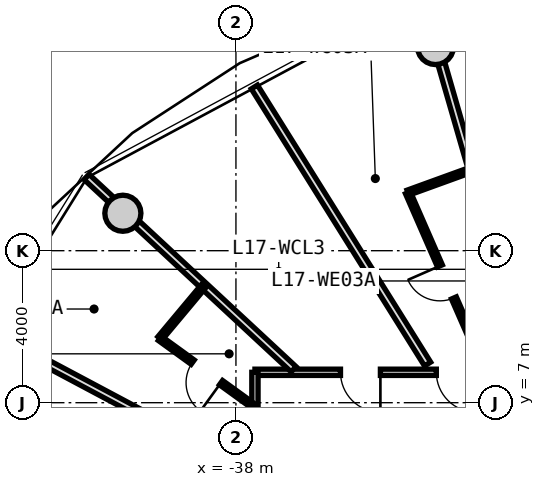
"""IFC4 building model, lengths in metres.
Left out: names, types, materials, properties, quantities, classifications, styles, units other than length and angle.
Written with IfcOpenShell. Run it as: python <this file> out.ifc"""

import sys

from ifc_helpers import new_model, si_unit, direction, frame, frame_2d, origin, origin_2d, place, context, subcontext, project, spatial, rectangle, circle, extrude, source, transform, mapped, element, fill, save


model = new_model("IFC4")
c1 = context("Model", 3, precision=1e-05, world=origin(), true_north=direction((0.0, 1.0)))
c2 = subcontext(c1, "Body", "Model", "MODEL_VIEW")
j1 = project(units=[si_unit("LENGTHUNIT", "METRE"), si_unit("PLANEANGLEUNIT", "RADIAN")], contexts=[c1])
p1 = place(None, origin())
s1 = spatial("IfcSite", under=j1, at=p1, CompositionType="ELEMENT")
p2 = place(p1, origin())
s2 = spatial("IfcBuilding", under=s1, at=p2, CompositionType="ELEMENT")
p3 = place(p2, frame((0.0, 0.0, 58.2)))
s3 = spatial("IfcBuildingStorey", under=s2, at=p3, CompositionType="ELEMENT", Elevation=58.2)
m1 = source(origin(), c2, "Body", "SweptSolid", [
    extrude(circle(Radius=0.475, at=origin_2d()), origin(), (0.0, 0.0, 1.0), 3.05),
])
for number, where, z_axis, x_axis in (
    (1, (-32.749, 16.373, 0.0), (0.0, 0.0, 1.0), (1.0, 0.0, 0.0)),
    (2, (-40.975, 11.985, 0.0), (0.0, 0.0, 1.0), (1.0, 0.0, 0.0)),
):
    element("IfcColumn", number, at=place(p3, frame(where, z_axis=z_axis, x_axis=x_axis)), inside=s3, PredefinedType="COLUMN", context=c2, shape_type="MappedRepresentation", body=[
        mapped(m1, transform((0.0, 0.0, 0.0), x_axis=(1.0, 0.0, 0.0), y_axis=(0.0, 1.0, 0.0), z_axis=(0.0, 0.0, 1.0), scale=1.0)),
    ])
m2 = source(origin(), c2, "Body", "SweptSolid", [
    extrude(rectangle(XDim=19.0, YDim=0.165, at=frame_2d((9.5, 0.0))), origin(), (0.0, 0.0, 1.0), 2.775),
])
p4 = place(p3, frame((-37.5, 7.8, 0.0), z_axis=(0.0, 0.0, 1.0), x_axis=(1.0, 0.0, 0.0)))
e3 = element("IfcWall", 3, at=p4, inside=s3, PredefinedType="PARTITIONING", context=c2, shape_type="MappedRepresentation", body=[
    mapped(m2, transform((0.0, 0.0, 0.0), x_axis=(1.0, 0.0, 0.0), y_axis=(0.0, 1.0, 0.0), z_axis=(0.0, 0.0, 1.0), scale=1.0)),
])
p5 = place(p4, frame((14.653, 0.0, 0.0)))
e4 = element("IfcOpeningElement", 4, at=p5, cuts=e3, PredefinedType="OPENING", context=c2, shape_type="SweptSolid", body=[
    extrude(rectangle(XDim=1.05, YDim=2.15, at=frame_2d((0.525, 1.075))), frame((0.0, 0.093, 0.0), z_axis=(0.0, -1.0, 0.0), x_axis=(1.0, 0.0, 0.0)), (0.0, 0.0, 1.0), 0.185),
])
p6 = place(p4, frame((12.5, 0.0, 0.0)))
e5 = element("IfcOpeningElement", 5, at=p6, cuts=e3, PredefinedType="OPENING", context=c2, shape_type="SweptSolid", body=[
    extrude(rectangle(XDim=1.05, YDim=2.15, at=frame_2d((0.525, 1.075))), frame((0.0, 0.093, 0.0), z_axis=(0.0, -1.0, 0.0), x_axis=(1.0, 0.0, 0.0)), (0.0, 0.0, 1.0), 0.185),
])
p7 = place(p4, frame((9.352, 0.0, 0.0)))
e6 = element("IfcOpeningElement", 6, at=p7, cuts=e3, PredefinedType="OPENING", context=c2, shape_type="SweptSolid", body=[
    extrude(rectangle(XDim=1.05, YDim=2.15, at=frame_2d((0.525, 1.075))), frame((0.0, 0.093, 0.0), z_axis=(0.0, -1.0, 0.0), x_axis=(1.0, 0.0, 0.0)), (0.0, 0.0, 1.0), 0.185),
])
p8 = place(p4, frame((7.806, 0.0, 0.0)))
e7 = element("IfcOpeningElement", 7, at=p8, cuts=e3, PredefinedType="OPENING", context=c2, shape_type="SweptSolid", body=[
    extrude(rectangle(XDim=1.05, YDim=2.15, at=frame_2d((0.525, 1.075))), frame((0.0, 0.093, 0.0), z_axis=(0.0, -1.0, 0.0), x_axis=(1.0, 0.0, 0.0)), (0.0, 0.0, 1.0), 0.185),
])
p9 = place(p4, frame((4.773, 0.0, 0.0)))
e8 = element("IfcOpeningElement", 8, at=p9, cuts=e3, PredefinedType="OPENING", context=c2, shape_type="SweptSolid", body=[
    extrude(rectangle(XDim=1.05, YDim=2.15, at=frame_2d((0.525, 1.075))), frame((0.0, 0.093, 0.0), z_axis=(0.0, -1.0, 0.0), x_axis=(1.0, 0.0, 0.0)), (0.0, 0.0, 1.0), 0.185),
])
p10 = place(p4, frame((2.251, 0.0, 0.0)))
e9 = element("IfcOpeningElement", 9, at=p10, cuts=e3, PredefinedType="OPENING", context=c2, shape_type="SweptSolid", body=[
    extrude(rectangle(XDim=1.05, YDim=2.15, at=frame_2d((0.525, 1.075))), frame((0.0, 0.093, 0.0), z_axis=(0.0, -1.0, 0.0), x_axis=(1.0, 0.0, 0.0)), (0.0, 0.0, 1.0), 0.185),
])
m3 = source(origin(), c2, "Body", "SweptSolid", [
    extrude(rectangle(XDim=15.6, YDim=0.165, at=frame_2d((7.8, 0.0))), origin(), (0.0, 0.0, 1.0), 2.775),
])
p11 = place(p3, frame((-37.5, -7.8, 0.0), z_axis=(0.0, 0.0, 1.0), x_axis=(0.0, 1.0, 0.0)))
e10 = element("IfcWall", 10, at=p11, inside=s3, PredefinedType="PARTITIONING", context=c2, shape_type="MappedRepresentation", body=[
    mapped(m3, transform((0.0, 0.0, 0.0), x_axis=(1.0, 0.0, 0.0), y_axis=(0.0, 1.0, 0.0), z_axis=(0.0, 0.0, 1.0), scale=1.0)),
])
p12 = place(p11, frame((7.812, 0.0, 0.0)))
e11 = element("IfcOpeningElement", 11, at=p12, cuts=e10, PredefinedType="OPENING", context=c2, shape_type="SweptSolid", body=[
    extrude(rectangle(XDim=1.05, YDim=2.15, at=frame_2d((0.525, 1.075))), frame((0.0, 0.093, 0.0), z_axis=(0.0, -1.0, 0.0), x_axis=(1.0, 0.0, 0.0)), (0.0, 0.0, 1.0), 0.185),
])
p13 = place(p11, frame((6.035, 0.0, 0.0)))
e12 = element("IfcOpeningElement", 12, at=p13, cuts=e10, PredefinedType="OPENING", context=c2, shape_type="SweptSolid", body=[
    extrude(rectangle(XDim=1.05, YDim=2.15, at=frame_2d((0.525, 1.075))), frame((0.0, 0.093, 0.0), z_axis=(0.0, -1.0, 0.0), x_axis=(1.0, 0.0, 0.0)), (0.0, 0.0, 1.0), 0.185),
])
p14 = place(p11, frame((2.826, 0.0, 0.0)))
e13 = element("IfcOpeningElement", 13, at=p14, cuts=e10, PredefinedType="OPENING", context=c2, shape_type="SweptSolid", body=[
    extrude(rectangle(XDim=1.05, YDim=2.15, at=frame_2d((0.525, 1.075))), frame((0.0, 0.093, 0.0), z_axis=(0.0, -1.0, 0.0), x_axis=(1.0, 0.0, 0.0)), (0.0, 0.0, 1.0), 0.185),
])
p15 = place(p11, frame((0.881, 0.0, 0.0)))
e14 = element("IfcOpeningElement", 14, at=p15, cuts=e10, PredefinedType="OPENING", context=c2, shape_type="SweptSolid", body=[
    extrude(rectangle(XDim=1.05, YDim=2.15, at=frame_2d((0.525, 1.075))), frame((0.0, 0.093, 0.0), z_axis=(0.0, -1.0, 0.0), x_axis=(1.0, 0.0, 0.0)), (0.0, 0.0, 1.0), 0.185),
])
p16 = place(p11, frame((13.293, 0.0, 0.0)))
e15 = element("IfcOpeningElement", 15, at=p16, cuts=e10, PredefinedType="OPENING", context=c2, shape_type="SweptSolid", body=[
    extrude(rectangle(XDim=1.05, YDim=2.15, at=frame_2d((0.525, 1.075))), frame((0.0, 0.093, 0.0), z_axis=(0.0, -1.0, 0.0), x_axis=(1.0, 0.0, 0.0)), (0.0, 0.0, 1.0), 0.185),
])
p17 = place(p11, frame((11.018, 0.0, 0.0)))
e16 = element("IfcOpeningElement", 16, at=p17, cuts=e10, PredefinedType="OPENING", context=c2, shape_type="SweptSolid", body=[
    extrude(rectangle(XDim=1.05, YDim=2.15, at=frame_2d((0.525, 1.075))), frame((0.0, 0.093, 0.0), z_axis=(0.0, -1.0, 0.0), x_axis=(1.0, 0.0, 0.0)), (0.0, 0.0, 1.0), 0.185),
])
m4 = source(origin(), c2, "Body", "SweptSolid", [
    extrude(rectangle(XDim=10.196, YDim=0.19, at=frame_2d((5.098, 0.0))), origin(), (0.0, 0.0, 1.0), 2.225),
])
p18 = place(p3, frame((-30.273, 7.88, 0.0), z_axis=(0.0, 0.0, 1.0), x_axis=(-0.277136420347, 0.960830580549, 0.0)))
e17 = element("IfcWall", 17, at=p18, inside=s3, PredefinedType="PARTITIONING", context=c2, shape_type="MappedRepresentation", body=[
    mapped(m4, transform((0.0, 0.0, 0.0), x_axis=(1.0, 0.0, 0.0), y_axis=(0.0, 1.0, 0.0), z_axis=(0.0, 0.0, 1.0), scale=1.0)),
])
m5 = source(origin(), c2, "Body", "SweptSolid", [
    extrude(rectangle(XDim=7.435, YDim=0.19, at=frame_2d((3.717, 0.0))), origin(), (0.0, 0.0, 1.0), 2.225),
])
p19 = place(p3, frame((-36.483, 7.88, 0.0), z_axis=(0.0, 0.0, 1.0), x_axis=(-0.732651956848, 0.680603489652, 0.0)))
e18 = element("IfcWall", 18, at=p19, inside=s3, PredefinedType="PARTITIONING", context=c2, shape_type="MappedRepresentation", body=[
    mapped(m5, transform((0.0, 0.0, 0.0), x_axis=(1.0, 0.0, 0.0), y_axis=(0.0, 1.0, 0.0), z_axis=(0.0, 0.0, 1.0), scale=1.0)),
])
m6 = source(origin(), c2, "Body", "SweptSolid", [
    extrude(rectangle(XDim=8.598, YDim=0.19, at=frame_2d((4.299, 0.0))), origin(), (0.0, 0.0, 1.0), 2.775),
])
p20 = place(p3, frame((-32.957, 8.017, 0.0), z_axis=(0.0, 0.0, 1.0), x_axis=(-0.530039776395, 0.847972779893, 0.0)))
e19 = element("IfcWall", 19, at=p20, inside=s3, PredefinedType="PARTITIONING", context=c2, shape_type="MappedRepresentation", body=[
    mapped(m6, transform((0.0, 0.0, 0.0), x_axis=(1.0, 0.0, 0.0), y_axis=(0.0, 1.0, 0.0), z_axis=(0.0, 0.0, 1.0), scale=1.0)),
])
m7 = source(origin(), c2, "Body", "SweptSolid", [
    extrude(rectangle(XDim=5.126, YDim=0.14, at=frame_2d((2.563, 0.0))), origin(), (0.0, 0.0, 1.0), 2.775),
])
p21 = place(p3, frame((-31.422, 7.83, 0.0), z_axis=(0.0, 0.0, 1.0), x_axis=(-0.400473994842, 0.916308124735, 0.0)))
e20 = element("IfcWall", 20, at=p21, inside=s3, PredefinedType="PARTITIONING", context=c2, shape_type="MappedRepresentation", body=[
    mapped(m7, transform((0.0, 0.0, 0.0), x_axis=(1.0, 0.0, 0.0), y_axis=(0.0, 1.0, 0.0), z_axis=(0.0, 0.0, 1.0), scale=1.0)),
])
p22 = place(p21, frame((2.103, 0.0, 0.0)))
e21 = element("IfcOpeningElement", 21, at=p22, cuts=e20, PredefinedType="OPENING", context=c2, shape_type="SweptSolid", body=[
    extrude(rectangle(XDim=0.92, YDim=2.1, at=frame_2d((0.46, 1.05))), frame((0.0, 0.08, 0.0), z_axis=(0.0, -1.0, 0.0), x_axis=(1.0, 0.0, 0.0)), (0.0, 0.0, 1.0), 0.16),
])
m8 = source(origin(), c2, "Body", "SweptSolid", [
    extrude(rectangle(XDim=1.811, YDim=0.14, at=frame_2d((0.906, 0.0))), origin(), (0.0, 0.0, 1.0), 2.775),
])
p23 = place(p3, frame((-33.475, 12.527, 0.0), z_axis=(0.0, 0.0, 1.0), x_axis=(0.940009682452, 0.341147764021, 0.0)))
e22 = element("IfcWall", 22, at=p23, inside=s3, PredefinedType="PARTITIONING", context=c2, shape_type="MappedRepresentation", body=[
    mapped(m8, transform((0.0, 0.0, 0.0), x_axis=(1.0, 0.0, 0.0), y_axis=(0.0, 1.0, 0.0), z_axis=(0.0, 0.0, 1.0), scale=1.0)),
])
m9 = source(origin(), c2, "Body", "SweptSolid", [
    extrude(rectangle(XDim=7.677, YDim=0.19, at=frame_2d((3.838, 0.0))), origin(), (0.0, 0.0, 1.0), 2.775),
])
p24 = place(p3, frame((-37.703, 5.231, 0.0), z_axis=(0.0, 0.0, 1.0), x_axis=(-0.882725057546, 0.469889851753, 0.0)))
e23 = element("IfcWall", 23, at=p24, inside=s3, PredefinedType="PARTITIONING", context=c2, shape_type="MappedRepresentation", body=[
    mapped(m9, transform((0.0, 0.0, 0.0), x_axis=(1.0, 0.0, 0.0), y_axis=(0.0, 1.0, 0.0), z_axis=(0.0, 0.0, 1.0), scale=1.0)),
])
m10 = source(origin(), c2, "Body", "SweptSolid", [
    extrude(rectangle(XDim=3.051, YDim=0.14, at=frame_2d((1.525, 0.0))), origin(), (0.0, 0.0, 1.0), 2.775),
])
p25 = place(p3, frame((-37.53, 6.903, 0.0), z_axis=(0.0, 0.0, 1.0), x_axis=(-0.809849031404, 0.586638343729, 0.0)))
e24 = element("IfcWall", 24, at=p25, inside=s3, PredefinedType="PARTITIONING", context=c2, shape_type="MappedRepresentation", body=[
    mapped(m10, transform((0.0, 0.0, 0.0), x_axis=(1.0, 0.0, 0.0), y_axis=(0.0, 1.0, 0.0), z_axis=(0.0, 0.0, 1.0), scale=1.0)),
])
p26 = place(p25, frame((1.065, 0.0, 0.0)))
e25 = element("IfcOpeningElement", 25, at=p26, cuts=e24, PredefinedType="OPENING", context=c2, shape_type="SweptSolid", body=[
    extrude(rectangle(XDim=0.92, YDim=2.1, at=frame_2d((0.46, 1.05))), frame((0.0, 0.08, 0.0), z_axis=(0.0, -1.0, 0.0), x_axis=(1.0, 0.0, 0.0)), (0.0, 0.0, 1.0), 0.16),
])
m11 = source(origin(), c2, "Body", "SweptSolid", [
    extrude(rectangle(XDim=1.84, YDim=0.14, at=frame_2d((0.92, 0.0))), origin(), (0.0, 0.0, 1.0), 2.415),
])
p27 = place(p3, frame((-40.0, 8.692, 0.0), z_axis=(0.0, 0.0, 1.0), x_axis=(0.641410397049, 0.767197955262, 0.0)))
e26 = element("IfcWall", 26, at=p27, inside=s3, PredefinedType="PARTITIONING", context=c2, shape_type="MappedRepresentation", body=[
    mapped(m11, transform((0.0, 0.0, 0.0), x_axis=(1.0, 0.0, 0.0), y_axis=(0.0, 1.0, 0.0), z_axis=(0.0, 0.0, 1.0), scale=1.0)),
])
m12 = source(origin(), c2, "Body", "SweptSolid", [
    extrude(rectangle(XDim=1.05, YDim=2.15, at=frame_2d((0.525, 1.075))), frame((0.0, 0.025, 0.0), z_axis=(0.0, -1.0, 0.0), x_axis=(1.0, 0.0, 0.0)), (0.0, 0.0, 1.0), 0.05),
])
p28 = place(p9, frame((1.05, 0.0, 0.0), z_axis=(0.0, 0.0, 1.0), x_axis=(-1.0, 0.0, 0.0)))
e27 = element("IfcDoor", 27, at=p28, inside=s3, OperationType="SINGLE_SWING_LEFT", PredefinedType="DOOR", context=c2, shape_type="MappedRepresentation", body=[
    mapped(m12, transform((0.0, 0.0, 0.0), x_axis=(1.0, 0.0, 0.0), y_axis=(0.0, 1.0, 0.0), z_axis=(0.0, 0.0, 1.0), scale=1.0)),
])
fill(e8, e27)
m13 = source(origin(), c2, "Body", "SweptSolid", [
    extrude(rectangle(XDim=0.92, YDim=2.1, at=frame_2d((0.46, 1.05))), frame((0.0, 0.025, 0.0), z_axis=(0.0, -1.0, 0.0), x_axis=(1.0, 0.0, 0.0)), (0.0, 0.0, 1.0), 0.05),
])
p29 = place(p22, origin())
e28 = element("IfcDoor", 28, at=p29, inside=s3, OperationType="SINGLE_SWING_RIGHT", PredefinedType="DOOR", context=c2, shape_type="MappedRepresentation", body=[
    mapped(m13, transform((0.0, 0.0, 0.0), x_axis=(1.0, 0.0, 0.0), y_axis=(0.0, 1.0, 0.0), z_axis=(0.0, 0.0, 1.0), scale=1.0)),
])
fill(e21, e28)
p30 = place(p10, frame((1.05, 0.0, 0.0), z_axis=(0.0, 0.0, 1.0), x_axis=(-1.0, 0.0, 0.0)))
e29 = element("IfcDoor", 29, at=p30, inside=s3, OperationType="SINGLE_SWING_LEFT", PredefinedType="DOOR", context=c2, shape_type="MappedRepresentation", body=[
    mapped(m12, transform((0.0, 0.0, 0.0), x_axis=(1.0, 0.0, 0.0), y_axis=(0.0, 1.0, 0.0), z_axis=(0.0, 0.0, 1.0), scale=1.0)),
])
fill(e9, e29)
p31 = place(p26, origin())
e30 = element("IfcDoor", 30, at=p31, inside=s3, OperationType="SINGLE_SWING_LEFT", PredefinedType="DOOR", context=c2, shape_type="MappedRepresentation", body=[
    mapped(m13, transform((0.0, 0.0, 0.0), x_axis=(1.0, 0.0, 0.0), y_axis=(0.0, 1.0, 0.0), z_axis=(0.0, 0.0, 1.0), scale=1.0)),
])
fill(e25, e30)
save(model, sys.argv[1])
